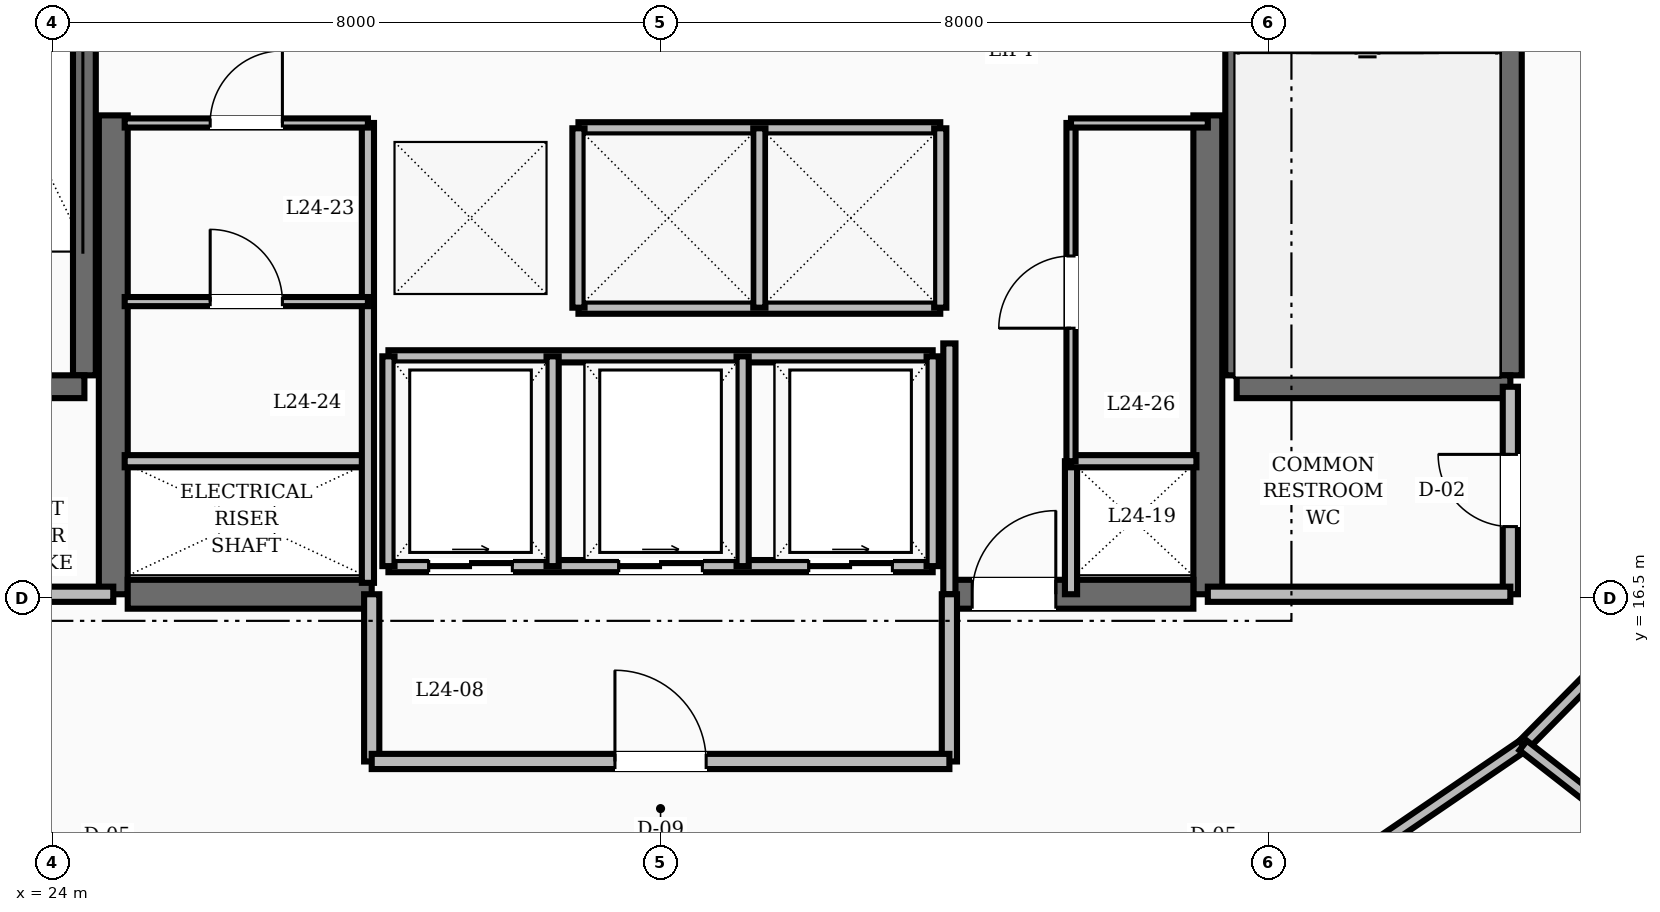
"""IFC4 building model, lengths in metres.
Left out: names, types, materials, properties, quantities, classifications, styles, units other than length and angle.
Written with IfcOpenShell. Run it as: python <this file> out.ifc"""

import sys

from ifc_helpers import new_model, si_unit, direction, frame, frame_2d, origin, place, context, subcontext, project, spatial, rectangle, extrude, element, fill, save


model = new_model("IFC4")
c1 = context("Model", 3, precision=1e-05, world=origin(), true_north=direction((0.0, 1.0)))
c2 = subcontext(c1, "Body", "Model", "MODEL_VIEW")
j1 = project(units=[si_unit("LENGTHUNIT", "METRE"), si_unit("PLANEANGLEUNIT", "RADIAN")], contexts=[c1])
p1 = place(None, origin())
s1 = spatial("IfcSite", under=j1, at=p1, CompositionType="ELEMENT")
p2 = place(p1, origin())
s2 = spatial("IfcBuilding", under=s1, at=p2, CompositionType="ELEMENT")
p3 = place(p2, frame((0.0, 0.0, 95.2)))
s3 = spatial("IfcBuildingStorey", under=s2, at=p3, CompositionType="ELEMENT", Elevation=95.2)
for number, where, z_axis, x_axis in (
    (1, (24.8, 16.55, 0.0), (0.0, 0.0, 1.0), (0.0, 1.0, 0.0)),
    (2, (39.2, 16.55, 0.0), (0.0, 0.0, 1.0), (0.0, 1.0, 0.0)),
):
    element("IfcWall", number, at=place(p3, frame(where, z_axis=z_axis, x_axis=x_axis)), inside=s3, PredefinedType="SHEAR", context=c2, shape_type="SweptSolid", body=[
        extrude(rectangle(XDim=6.3, YDim=0.38, at=frame_2d((3.15, 0.0))), origin(), (0.0, 0.0, 1.0), 3.6),
    ])
p4 = place(p3, frame((24.99, 16.55, 0.0), z_axis=(0.0, 0.0, 1.0), x_axis=(1.0, 0.0, 0.0)))
e3 = element("IfcWall", 3, at=p4, inside=s3, PredefinedType="SHEAR", context=c2, shape_type="SweptSolid", body=[
    extrude(rectangle(XDim=3.21, YDim=0.38, at=frame_2d((1.605, 0.0))), origin(), (0.0, 0.0, 1.0), 3.6),
])
p5 = place(p3, frame((35.8, 16.55, 0.0), z_axis=(0.0, 0.0, 1.0), x_axis=(1.0, 0.0, 0.0)))
e4 = element("IfcWall", 4, at=p5, inside=s3, PredefinedType="SHEAR", context=c2, shape_type="SweptSolid", body=[
    extrude(rectangle(XDim=3.21, YDim=0.38, at=frame_2d((1.605, 0.0))), origin(), (0.0, 0.0, 1.0), 3.6),
])
p6 = place(p5, frame((0.3, 0.0, 0.0)))
e5 = element("IfcOpeningElement", 5, at=p6, cuts=e4, PredefinedType="OPENING", context=c2, shape_type="SweptSolid", body=[
    extrude(rectangle(XDim=1.1, YDim=2.1, at=frame_2d((0.55, 1.05))), frame((0.0, 0.2, 0.0), z_axis=(0.0, -1.0, 0.0), x_axis=(1.0, 0.0, 0.0)), (0.0, 0.0, 1.0), 0.4),
])
p7 = place(p3, frame((24.42, 19.43, 0.0), z_axis=(0.0, 0.0, 1.0), x_axis=(0.0, 1.0, 0.0)))
e6 = element("IfcWall", 6, at=p7, inside=s3, PredefinedType="SHEAR", context=c2, shape_type="SweptSolid", body=[
    extrude(rectangle(XDim=8.74, YDim=0.3, at=frame_2d((4.37, 0.0))), origin(), (0.0, 0.0, 1.0), 3.6),
])
p8 = place(p3, frame((20.82, 19.28, 0.0), z_axis=(0.0, 0.0, 1.0), x_axis=(1.0, 0.0, 0.0)))
e7 = element("IfcWall", 7, at=p8, inside=s3, PredefinedType="SHEAR", context=c2, shape_type="SweptSolid", body=[
    extrude(rectangle(XDim=3.6, YDim=0.3, at=frame_2d((1.8, 0.0))), origin(), (0.0, 0.0, 1.0), 3.6),
])
p9 = place(p8, frame((1.3, 0.0, 0.0)))
e8 = element("IfcOpeningElement", 8, at=p9, cuts=e7, PredefinedType="OPENING", context=c2, shape_type="SweptSolid", body=[
    extrude(rectangle(XDim=1.1, YDim=2.1, at=frame_2d((0.55, 1.05))), frame((0.0, 0.16, 0.0), z_axis=(0.0, -1.0, 0.0), x_axis=(1.0, 0.0, 0.0)), (0.0, 0.0, 1.0), 0.32),
])
for number, where, z_axis, x_axis in (
    (9, (43.18, 19.43, 0.0), (0.0, 0.0, 1.0), (0.0, 1.0, 0.0)),
    (10, (39.58, 19.43, 0.0), (0.0, 0.0, 1.0), (0.0, 1.0, 0.0)),
):
    element("IfcWall", number, at=place(p3, frame(where, z_axis=z_axis, x_axis=x_axis)), inside=s3, PredefinedType="SHEAR", context=c2, shape_type="SweptSolid", body=[
        extrude(rectangle(XDim=8.74, YDim=0.3, at=frame_2d((4.37, 0.0))), origin(), (0.0, 0.0, 1.0), 3.6),
    ])
p10 = place(p3, frame((39.58, 19.28, 0.0), z_axis=(0.0, 0.0, 1.0), x_axis=(1.0, 0.0, 0.0)))
e11 = element("IfcWall", 11, at=p10, inside=s3, PredefinedType="SHEAR", context=c2, shape_type="SweptSolid", body=[
    extrude(rectangle(XDim=3.6, YDim=0.3, at=frame_2d((1.8, 0.0))), origin(), (0.0, 0.0, 1.0), 3.6),
])
p11 = place(p3, frame((20.82, 16.55, 0.0), z_axis=(0.0, 0.0, 1.0), x_axis=(1.0, 0.0, 0.0)))
e12 = element("IfcWall", 12, at=p11, inside=s3, PredefinedType="SOLIDWALL", context=c2, shape_type="SweptSolid", body=[
    extrude(rectangle(XDim=3.98, YDim=0.2, at=frame_2d((1.99, 0.0))), origin(), (0.0, 0.0, 1.0), 2.71),
])
p12 = place(p3, frame((43.18, 16.55, 0.0), z_axis=(0.0, 0.0, 1.0), x_axis=(0.0, 1.0, 0.0)))
e13 = element("IfcWall", 13, at=p12, inside=s3, PredefinedType="SOLIDWALL", context=c2, shape_type="SweptSolid", body=[
    extrude(rectangle(XDim=2.73, YDim=0.2, at=frame_2d((1.365, 0.0))), origin(), (0.0, 0.0, 1.0), 2.71),
])
p13 = place(p12, frame((0.89, 0.0, 0.0)))
e14 = element("IfcOpeningElement", 14, at=p13, cuts=e13, PredefinedType="OPENING", context=c2, shape_type="SweptSolid", body=[
    extrude(rectangle(XDim=0.95, YDim=2.1, at=frame_2d((0.475, 1.05))), frame((0.0, 0.11, 0.0), z_axis=(0.0, -1.0, 0.0), x_axis=(1.0, 0.0, 0.0)), (0.0, 0.0, 1.0), 0.22),
])
p14 = place(p3, frame((39.2, 16.55, 0.0), z_axis=(0.0, 0.0, 1.0), x_axis=(1.0, 0.0, 0.0)))
e15 = element("IfcWall", 15, at=p14, inside=s3, PredefinedType="SOLIDWALL", context=c2, shape_type="SweptSolid", body=[
    extrude(rectangle(XDim=3.98, YDim=0.2, at=frame_2d((1.99, 0.0))), origin(), (0.0, 0.0, 1.0), 2.71),
])
p15 = place(p3, frame((35.8, 16.55, 0.0), z_axis=(0.0, 0.0, 1.0), x_axis=(0.0, 1.0, 0.0)))
e16 = element("IfcWall", 16, at=p15, inside=s3, PredefinedType="SOLIDWALL", context=c2, shape_type="SweptSolid", body=[
    extrude(rectangle(XDim=3.3, YDim=0.16, at=frame_2d((1.65, 0.0))), origin(), (0.0, 0.0, 1.0), 2.71),
])
p16 = place(p3, frame((37.4, 16.55, 0.0), z_axis=(0.0, 0.0, 1.0), x_axis=(0.0, 1.0, 0.0)))
e17 = element("IfcWall", 17, at=p16, inside=s3, PredefinedType="SOLIDWALL", context=c2, shape_type="SweptSolid", body=[
    extrude(rectangle(XDim=1.75, YDim=0.16, at=frame_2d((0.875, 0.0))), origin(), (0.0, 0.0, 1.0), 2.71),
])
for number, where, z_axis, x_axis in (
    (18, (28.2, 14.35, 0.0), (0.0, 0.0, 1.0), (0.0, 1.0, 0.0)),
    (19, (35.8, 14.35, 0.0), (0.0, 0.0, 1.0), (0.0, 1.0, 0.0)),
):
    element("IfcWall", number, at=place(p3, frame(where, z_axis=z_axis, x_axis=x_axis)), inside=s3, PredefinedType="SOLIDWALL", context=c2, shape_type="SweptSolid", body=[
        extrude(rectangle(XDim=2.2, YDim=0.2, at=frame_2d((1.1, 0.0))), origin(), (0.0, 0.0, 1.0), 2.71),
    ])
p17 = place(p3, frame((28.2, 14.35, 0.0), z_axis=(0.0, 0.0, 1.0), x_axis=(1.0, 0.0, 0.0)))
e20 = element("IfcWall", 20, at=p17, inside=s3, PredefinedType="SOLIDWALL", context=c2, shape_type="SweptSolid", body=[
    extrude(rectangle(XDim=7.6, YDim=0.2, at=frame_2d((3.8, 0.0))), origin(), (0.0, 0.0, 1.0), 2.71),
])
p18 = place(p17, frame((3.2, 0.0, 0.0)))
e21 = element("IfcOpeningElement", 21, at=p18, cuts=e20, PredefinedType="OPENING", context=c2, shape_type="SweptSolid", body=[
    extrude(rectangle(XDim=1.2, YDim=2.1, at=frame_2d((0.6, 1.05))), frame((0.0, 0.11, 0.0), z_axis=(0.0, -1.0, 0.0), x_axis=(1.0, 0.0, 0.0)), (0.0, 0.0, 1.0), 0.22),
])
for number, where, z_axis, x_axis in (
    (22, (30.92, 22.68, 0.0), (0.0, 0.0, 1.0), (1.0, 0.0, 0.0)),
    (23, (30.92, 20.32, 0.0), (0.0, 0.0, 1.0), (1.0, 0.0, 0.0)),
):
    element("IfcWall", number, at=place(p3, frame(where, z_axis=z_axis, x_axis=x_axis)), inside=s3, PredefinedType="SOLIDWALL", context=c2, shape_type="SweptSolid", body=[
        extrude(rectangle(XDim=4.76, YDim=0.16, at=frame_2d((2.38, 0.0))), origin(), (0.0, 0.0, 1.0), 2.71),
    ])
for number, where, z_axis, x_axis in (
    (24, (30.92, 20.32, 0.0), (0.0, 0.0, 1.0), (0.0, 1.0, 0.0)),
    (25, (33.3, 20.32, 0.0), (0.0, 0.0, 1.0), (0.0, 1.0, 0.0)),
    (26, (35.68, 20.32, 0.0), (0.0, 0.0, 1.0), (0.0, 1.0, 0.0)),
):
    element("IfcWall", number, at=place(p3, frame(where, z_axis=z_axis, x_axis=x_axis)), inside=s3, PredefinedType="SOLIDWALL", context=c2, shape_type="SweptSolid", body=[
        extrude(rectangle(XDim=2.36, YDim=0.16, at=frame_2d((1.18, 0.0))), origin(), (0.0, 0.0, 1.0), 2.71),
    ])
p19 = place(p3, frame((28.42, 16.92, 0.0), z_axis=(0.0, 0.0, 1.0), x_axis=(1.0, 0.0, 0.0)))
e27 = element("IfcWall", 27, at=p19, inside=s3, PredefinedType="SOLIDWALL", context=c2, shape_type="SweptSolid", body=[
    extrude(rectangle(XDim=7.16, YDim=0.16, at=frame_2d((3.58, 0.0))), origin(), (0.0, 0.0, 1.0), 2.71),
])
p20 = place(p19, frame((0.53, 0.0, 0.0)))
e28 = element("IfcOpeningElement", 28, at=p20, cuts=e27, PredefinedType="OPENING", context=c2, shape_type="SweptSolid", body=[
    extrude(rectangle(XDim=1.1, YDim=2.15, at=frame_2d((0.55, 1.075))), frame((0.0, 0.09, 0.0), z_axis=(0.0, -1.0, 0.0), x_axis=(1.0, 0.0, 0.0)), (0.0, 0.0, 1.0), 0.18),
])
p21 = place(p19, frame((3.03, 0.0, 0.0)))
e29 = element("IfcOpeningElement", 29, at=p21, cuts=e27, PredefinedType="OPENING", context=c2, shape_type="SweptSolid", body=[
    extrude(rectangle(XDim=1.1, YDim=2.15, at=frame_2d((0.55, 1.075))), frame((0.0, 0.09, 0.0), z_axis=(0.0, -1.0, 0.0), x_axis=(1.0, 0.0, 0.0)), (0.0, 0.0, 1.0), 0.18),
])
p22 = place(p19, frame((5.53, 0.0, 0.0)))
e30 = element("IfcOpeningElement", 30, at=p22, cuts=e27, PredefinedType="OPENING", context=c2, shape_type="SweptSolid", body=[
    extrude(rectangle(XDim=1.1, YDim=2.15, at=frame_2d((0.55, 1.075))), frame((0.0, 0.09, 0.0), z_axis=(0.0, -1.0, 0.0), x_axis=(1.0, 0.0, 0.0)), (0.0, 0.0, 1.0), 0.18),
])
p23 = place(p3, frame((28.42, 19.68, 0.0), z_axis=(0.0, 0.0, 1.0), x_axis=(1.0, 0.0, 0.0)))
e31 = element("IfcWall", 31, at=p23, inside=s3, PredefinedType="SOLIDWALL", context=c2, shape_type="SweptSolid", body=[
    extrude(rectangle(XDim=7.16, YDim=0.16, at=frame_2d((3.58, 0.0))), origin(), (0.0, 0.0, 1.0), 2.71),
])
for number, where, z_axis, x_axis in (
    (32, (28.42, 16.92, 0.0), (0.0, 0.0, 1.0), (0.0, 1.0, 0.0)),
    (33, (30.58, 16.92, 0.0), (0.0, 0.0, 1.0), (0.0, 1.0, 0.0)),
    (34, (33.08, 16.92, 0.0), (0.0, 0.0, 1.0), (0.0, 1.0, 0.0)),
    (35, (35.58, 16.92, 0.0), (0.0, 0.0, 1.0), (0.0, 1.0, 0.0)),
):
    element("IfcWall", number, at=place(p3, frame(where, z_axis=z_axis, x_axis=x_axis)), inside=s3, PredefinedType="SOLIDWALL", context=c2, shape_type="SweptSolid", body=[
        extrude(rectangle(XDim=2.76, YDim=0.16, at=frame_2d((1.38, 0.0))), origin(), (0.0, 0.0, 1.0), 2.71),
    ])
p24 = place(p3, frame((24.95, 18.3, 0.0), z_axis=(0.0, 0.0, 1.0), x_axis=(1.0, 0.0, 0.0)))
e36 = element("IfcWall", 36, at=p24, inside=s3, PredefinedType="SOLIDWALL", context=c2, shape_type="SweptSolid", body=[
    extrude(rectangle(XDim=3.2, YDim=0.16, at=frame_2d((1.6, 0.0))), origin(), (0.0, 0.0, 1.0), 2.71),
])
p25 = place(p3, frame((28.15, 16.7, 0.0), z_axis=(0.0, 0.0, 1.0), x_axis=(0.0, 1.0, 0.0)))
e37 = element("IfcWall", 37, at=p25, inside=s3, PredefinedType="SOLIDWALL", context=c2, shape_type="SweptSolid", body=[
    extrude(rectangle(XDim=6.05, YDim=0.16, at=frame_2d((3.025, 0.0))), origin(), (0.0, 0.0, 1.0), 2.71),
])
p26 = place(p3, frame((37.4, 18.3, 0.0), z_axis=(0.0, 0.0, 1.0), x_axis=(1.0, 0.0, 0.0)))
e38 = element("IfcWall", 38, at=p26, inside=s3, PredefinedType="SOLIDWALL", context=c2, shape_type="SweptSolid", body=[
    extrude(rectangle(XDim=1.65, YDim=0.16, at=frame_2d((0.825, 0.0))), origin(), (0.0, 0.0, 1.0), 2.71),
])
p27 = place(p3, frame((24.95, 22.75, 0.0), z_axis=(0.0, 0.0, 1.0), x_axis=(1.0, 0.0, 0.0)))
e39 = element("IfcWall", 39, at=p27, inside=s3, PredefinedType="PARTITIONING", context=c2, shape_type="SweptSolid", body=[
    extrude(rectangle(XDim=3.2, YDim=0.12, at=frame_2d((1.6, 0.0))), origin(), (0.0, 0.0, 1.0), 2.71),
])
p28 = place(p27, frame((1.125, 0.0, 0.0)))
e40 = element("IfcOpeningElement", 40, at=p28, cuts=e39, PredefinedType="OPENING", context=c2, shape_type="SweptSolid", body=[
    extrude(rectangle(XDim=0.95, YDim=2.1, at=frame_2d((0.475, 1.05))), frame((0.0, 0.07, 0.0), z_axis=(0.0, -1.0, 0.0), x_axis=(1.0, 0.0, 0.0)), (0.0, 0.0, 1.0), 0.14),
])
p29 = place(p3, frame((37.4, 18.3, 0.0), z_axis=(0.0, 0.0, 1.0), x_axis=(0.0, 1.0, 0.0)))
e41 = element("IfcWall", 41, at=p29, inside=s3, PredefinedType="PARTITIONING", context=c2, shape_type="SweptSolid", body=[
    extrude(rectangle(XDim=4.45, YDim=0.12, at=frame_2d((2.225, 0.0))), origin(), (0.0, 0.0, 1.0), 2.71),
])
p30 = place(p29, frame((1.75, 0.0, 0.0)))
e42 = element("IfcOpeningElement", 42, at=p30, cuts=e41, PredefinedType="OPENING", context=c2, shape_type="SweptSolid", body=[
    extrude(rectangle(XDim=0.95, YDim=2.1, at=frame_2d((0.475, 1.05))), frame((0.0, 0.07, 0.0), z_axis=(0.0, -1.0, 0.0), x_axis=(1.0, 0.0, 0.0)), (0.0, 0.0, 1.0), 0.14),
])
p31 = place(p3, frame((37.4, 22.75, 0.0), z_axis=(0.0, 0.0, 1.0), x_axis=(1.0, 0.0, 0.0)))
e43 = element("IfcWall", 43, at=p31, inside=s3, PredefinedType="PARTITIONING", context=c2, shape_type="SweptSolid", body=[
    extrude(rectangle(XDim=1.8, YDim=0.12, at=frame_2d((0.9, 0.0))), origin(), (0.0, 0.0, 1.0), 2.71),
])
p32 = place(p3, frame((24.95, 20.4, 0.0), z_axis=(0.0, 0.0, 1.0), x_axis=(1.0, 0.0, 0.0)))
e44 = element("IfcWall", 44, at=p32, inside=s3, PredefinedType="PARTITIONING", context=c2, shape_type="SweptSolid", body=[
    extrude(rectangle(XDim=3.2, YDim=0.12, at=frame_2d((1.6, 0.0))), origin(), (0.0, 0.0, 1.0), 2.71),
])
p33 = place(p32, frame((1.125, 0.0, 0.0)))
e45 = element("IfcOpeningElement", 45, at=p33, cuts=e44, PredefinedType="OPENING", context=c2, shape_type="SweptSolid", body=[
    extrude(rectangle(XDim=0.95, YDim=2.1, at=frame_2d((0.475, 1.05))), frame((0.0, 0.07, 0.0), z_axis=(0.0, -1.0, 0.0), x_axis=(1.0, 0.0, 0.0)), (0.0, 0.0, 1.0), 0.14),
])
p34 = place(p3, frame((40.917, 12.9, 0.0), z_axis=(0.0, 0.0, 1.0), x_axis=(0.825929039072, 0.563774088104, 0.0)))
e46 = element("IfcWall", 46, at=p34, inside=s3, PredefinedType="SOLIDWALL", context=c2, shape_type="SweptSolid", body=[
    extrude(rectangle(XDim=2.945, YDim=0.16, at=frame_2d((1.472, 0.0))), origin(), (0.0, 0.0, 1.0), 2.71),
])
p35 = place(p3, frame((43.349, 14.56, 0.0), z_axis=(0.0, 0.0, 1.0), x_axis=(0.702366174226, 0.711815816981, 0.0)))
e47 = element("IfcWall", 47, at=p35, inside=s3, PredefinedType="SOLIDWALL", context=c2, shape_type="SweptSolid", body=[
    extrude(rectangle(XDim=2.842, YDim=0.16, at=frame_2d((1.421, 0.0))), origin(), (0.0, 0.0, 1.0), 2.71),
])
p36 = place(p3, frame((43.349, 14.56, 0.0), z_axis=(0.0, 0.0, 1.0), x_axis=(0.788377274066, -0.615192062478, 0.0)))
e48 = element("IfcWall", 48, at=p36, inside=s3, PredefinedType="SOLIDWALL", context=c2, shape_type="SweptSolid", body=[
    extrude(rectangle(XDim=9.205, YDim=0.16, at=frame_2d((4.603, 0.0))), origin(), (0.0, 0.0, 1.0), 2.71),
])
p37 = place(p13, origin())
e49 = element("IfcDoor", 49, at=p37, inside=s3, OperationType="SINGLE_SWING_RIGHT", PredefinedType="DOOR", context=c2, shape_type="SweptSolid", body=[
    extrude(rectangle(XDim=0.95, YDim=2.1, at=frame_2d((0.475, 1.05))), frame((0.0, 0.025, 0.0), z_axis=(0.0, -1.0, 0.0), x_axis=(1.0, 0.0, 0.0)), (0.0, 0.0, 1.0), 0.05),
])
fill(e14, e49)
p38 = place(p6, origin())
e50 = element("IfcDoor", 50, at=p38, inside=s3, OperationType="SINGLE_SWING_RIGHT", PredefinedType="DOOR", context=c2, shape_type="SweptSolid", body=[
    extrude(rectangle(XDim=1.1, YDim=2.1, at=frame_2d((0.55, 1.05))), frame((0.0, 0.025, 0.0), z_axis=(0.0, -1.0, 0.0), x_axis=(1.0, 0.0, 0.0)), (0.0, 0.0, 1.0), 0.05),
])
fill(e5, e50)
p39 = place(p18, origin())
e51 = element("IfcDoor", 51, at=p39, inside=s3, OperationType="SINGLE_SWING_LEFT", PredefinedType="DOOR", context=c2, shape_type="SweptSolid", body=[
    extrude(rectangle(XDim=1.2, YDim=2.1, at=frame_2d((0.6, 1.05))), frame((0.0, 0.025, 0.0), z_axis=(0.0, -1.0, 0.0), x_axis=(1.0, 0.0, 0.0)), (0.0, 0.0, 1.0), 0.05),
])
fill(e21, e51)
p40 = place(p20, origin())
e52 = element("IfcDoor", 52, at=p40, inside=s3, OperationType="SLIDING_TO_RIGHT", PredefinedType="DOOR", context=c2, shape_type="SweptSolid", body=[
    extrude(rectangle(XDim=1.1, YDim=2.15, at=frame_2d((0.55, 1.075))), frame((0.0, 0.025, 0.0), z_axis=(0.0, -1.0, 0.0), x_axis=(1.0, 0.0, 0.0)), (0.0, 0.0, 1.0), 0.05),
])
fill(e28, e52)
p41 = place(p21, origin())
e53 = element("IfcDoor", 53, at=p41, inside=s3, OperationType="SLIDING_TO_RIGHT", PredefinedType="DOOR", context=c2, shape_type="SweptSolid", body=[
    extrude(rectangle(XDim=1.1, YDim=2.15, at=frame_2d((0.55, 1.075))), frame((0.0, 0.025, 0.0), z_axis=(0.0, -1.0, 0.0), x_axis=(1.0, 0.0, 0.0)), (0.0, 0.0, 1.0), 0.05),
])
fill(e29, e53)
p42 = place(p22, origin())
e54 = element("IfcDoor", 54, at=p42, inside=s3, OperationType="SLIDING_TO_RIGHT", PredefinedType="DOOR", context=c2, shape_type="SweptSolid", body=[
    extrude(rectangle(XDim=1.1, YDim=2.15, at=frame_2d((0.55, 1.075))), frame((0.0, 0.025, 0.0), z_axis=(0.0, -1.0, 0.0), x_axis=(1.0, 0.0, 0.0)), (0.0, 0.0, 1.0), 0.05),
])
fill(e30, e54)
p43 = place(p28, origin())
e55 = element("IfcDoor", 55, at=p43, inside=s3, OperationType="SINGLE_SWING_RIGHT", PredefinedType="DOOR", context=c2, shape_type="SweptSolid", body=[
    extrude(rectangle(XDim=0.95, YDim=2.1, at=frame_2d((0.475, 1.05))), frame((0.0, 0.025, 0.0), z_axis=(0.0, -1.0, 0.0), x_axis=(1.0, 0.0, 0.0)), (0.0, 0.0, 1.0), 0.05),
])
fill(e40, e55)
p44 = place(p33, origin())
e56 = element("IfcDoor", 56, at=p44, inside=s3, OperationType="SINGLE_SWING_LEFT", PredefinedType="DOOR", context=c2, shape_type="SweptSolid", body=[
    extrude(rectangle(XDim=0.95, YDim=2.1, at=frame_2d((0.475, 1.05))), frame((0.0, 0.025, 0.0), z_axis=(0.0, -1.0, 0.0), x_axis=(1.0, 0.0, 0.0)), (0.0, 0.0, 1.0), 0.05),
])
fill(e45, e56)
p45 = place(p30, origin())
e57 = element("IfcDoor", 57, at=p45, inside=s3, OperationType="SINGLE_SWING_LEFT", PredefinedType="DOOR", context=c2, shape_type="SweptSolid", body=[
    extrude(rectangle(XDim=0.95, YDim=2.1, at=frame_2d((0.475, 1.05))), frame((0.0, 0.025, 0.0), z_axis=(0.0, -1.0, 0.0), x_axis=(1.0, 0.0, 0.0)), (0.0, 0.0, 1.0), 0.05),
])
fill(e42, e57)
save(model, sys.argv[1])
